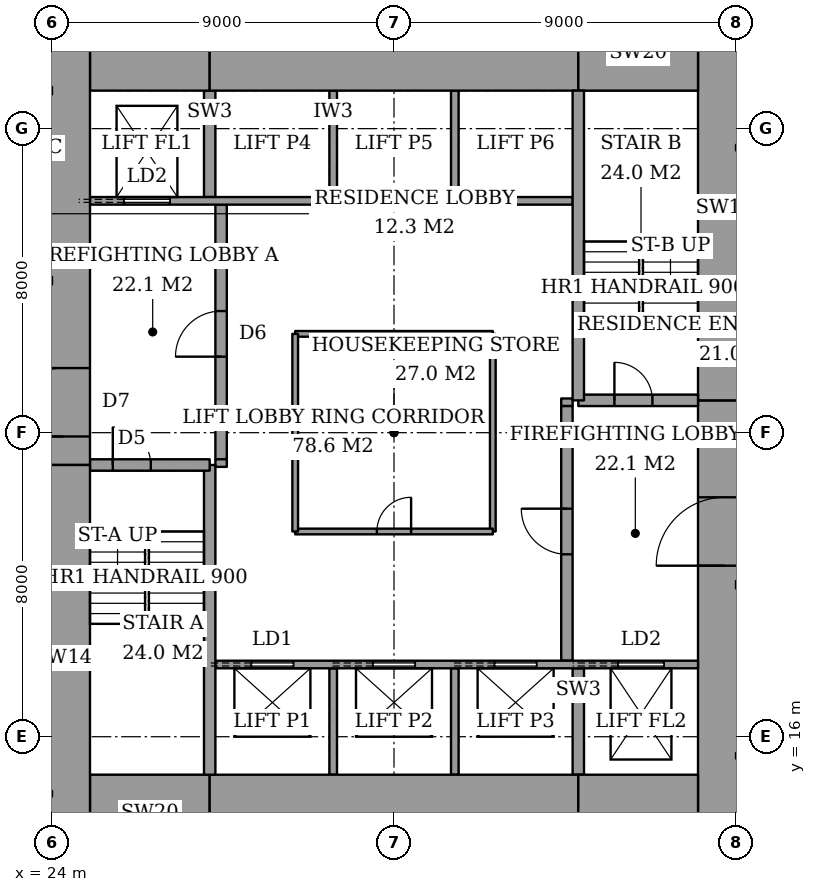
"""IFC4 building model, lengths in metres.
Left out: names, types, materials, properties, quantities, classifications, styles, units other than length and angle.
Written with IfcOpenShell. Run it as: python <this file> out.ifc"""

import sys

from ifc_helpers import new_model, si_unit, direction, frame, frame_2d, origin, place, context, subcontext, project, spatial, rectangle, extrude, element, fill, save


model = new_model("IFC4")
c1 = context("Model", 3, precision=1e-05, world=origin(), true_north=direction((0.0, 1.0)))
c2 = subcontext(c1, "Body", "Model", "MODEL_VIEW")
j1 = project(units=[si_unit("LENGTHUNIT", "METRE"), si_unit("PLANEANGLEUNIT", "RADIAN")], contexts=[c1])
p1 = place(None, origin())
s1 = spatial("IfcSite", under=j1, at=p1, CompositionType="ELEMENT")
p2 = place(p1, origin())
s2 = spatial("IfcBuilding", under=s1, at=p2, CompositionType="ELEMENT")
p3 = place(p2, frame((0.0, 0.0, 33.2)))
s3 = spatial("IfcBuildingStorey", under=s2, at=p3, CompositionType="ELEMENT", Elevation=33.2)
p4 = place(p3, frame((25.0, 14.0, 0.0), z_axis=(0.0, 0.0, 1.0), x_axis=(1.0, 0.0, 0.0)))
e1 = element("IfcWall", 1, at=p4, inside=s3, PredefinedType="SHEAR", context=c2, shape_type="SweptSolid", body=[
    extrude(rectangle(XDim=3.15, YDim=2.0, at=frame_2d((1.575, 0.0))), origin(), (0.0, 0.0, 1.0), 3.6),
])
p5 = place(p3, frame((28.15, 14.0, 0.0), z_axis=(0.0, 0.0, 1.0), x_axis=(1.0, 0.0, 0.0)))
e2 = element("IfcWall", 2, at=p5, inside=s3, PredefinedType="SHEAR", context=c2, shape_type="SweptSolid", body=[
    extrude(rectangle(XDim=9.7, YDim=2.0, at=frame_2d((4.85, 0.0))), origin(), (0.0, 0.0, 1.0), 3.6),
])
for number, where, z_axis, x_axis in (
    (3, (37.85, 14.0, 0.0), (0.0, 0.0, 1.0), (1.0, 0.0, 0.0)),
    (4, (25.0, 34.0, 0.0), (0.0, 0.0, 1.0), (1.0, 0.0, 0.0)),
):
    element("IfcWall", number, at=place(p3, frame(where, z_axis=z_axis, x_axis=x_axis)), inside=s3, PredefinedType="SHEAR", context=c2, shape_type="SweptSolid", body=[
        extrude(rectangle(XDim=3.15, YDim=2.0, at=frame_2d((1.575, 0.0))), origin(), (0.0, 0.0, 1.0), 3.6),
    ])
p6 = place(p3, frame((28.15, 34.0, 0.0), z_axis=(0.0, 0.0, 1.0), x_axis=(1.0, 0.0, 0.0)))
e5 = element("IfcWall", 5, at=p6, inside=s3, PredefinedType="SHEAR", context=c2, shape_type="SweptSolid", body=[
    extrude(rectangle(XDim=9.7, YDim=2.0, at=frame_2d((4.85, 0.0))), origin(), (0.0, 0.0, 1.0), 3.6),
])
p7 = place(p3, frame((37.85, 34.0, 0.0), z_axis=(0.0, 0.0, 1.0), x_axis=(1.0, 0.0, 0.0)))
e6 = element("IfcWall", 6, at=p7, inside=s3, PredefinedType="SHEAR", context=c2, shape_type="SweptSolid", body=[
    extrude(rectangle(XDim=3.15, YDim=2.0, at=frame_2d((1.575, 0.0))), origin(), (0.0, 0.0, 1.0), 3.6),
])
p8 = place(p3, frame((24.3, 13.0, 0.0), z_axis=(0.0, 0.0, 1.0), x_axis=(0.0, 1.0, 0.0)))
e7 = element("IfcWall", 7, at=p8, inside=s3, PredefinedType="SHEAR", context=c2, shape_type="SweptSolid", body=[
    extrude(rectangle(XDim=10.15, YDim=1.4, at=frame_2d((5.075, 0.0))), origin(), (0.0, 0.0, 1.0), 3.6),
])
p9 = place(p3, frame((24.3, 23.15, 0.0), z_axis=(0.0, 0.0, 1.0), x_axis=(0.0, 1.0, 0.0)))
e8 = element("IfcWall", 8, at=p9, inside=s3, PredefinedType="SHEAR", context=c2, shape_type="SweptSolid", body=[
    extrude(rectangle(XDim=11.85, YDim=1.4, at=frame_2d((5.925, 0.0))), origin(), (0.0, 0.0, 1.0), 3.6),
])
p10 = place(p9, frame((0.75, 0.0, 0.0)))
e9 = element("IfcOpeningElement", 9, at=p10, cuts=e8, PredefinedType="OPENING", context=c2, shape_type="SweptSolid", body=[
    extrude(rectangle(XDim=1.8, YDim=2.4, at=frame_2d((0.9, 1.2))), frame((0.0, 0.71, 0.0), z_axis=(0.0, -1.0, 0.0), x_axis=(1.0, 0.0, 0.0)), (0.0, 0.0, 1.0), 1.42),
])
p11 = place(p3, frame((41.7, 13.0, 0.0), z_axis=(0.0, 0.0, 1.0), x_axis=(0.0, 1.0, 0.0)))
e10 = element("IfcWall", 10, at=p11, inside=s3, PredefinedType="SHEAR", context=c2, shape_type="SweptSolid", body=[
    extrude(rectangle(XDim=11.85, YDim=1.4, at=frame_2d((5.925, 0.0))), origin(), (0.0, 0.0, 1.0), 3.6),
])
p12 = place(p11, frame((7.5, 0.0, 0.0)))
e11 = element("IfcOpeningElement", 11, at=p12, cuts=e10, PredefinedType="OPENING", context=c2, shape_type="SweptSolid", body=[
    extrude(rectangle(XDim=1.8, YDim=2.4, at=frame_2d((0.9, 1.2))), frame((0.0, 0.71, 0.0), z_axis=(0.0, -1.0, 0.0), x_axis=(1.0, 0.0, 0.0)), (0.0, 0.0, 1.0), 1.42),
])
p13 = place(p3, frame((41.7, 24.85, 0.0), z_axis=(0.0, 0.0, 1.0), x_axis=(0.0, 1.0, 0.0)))
e12 = element("IfcWall", 12, at=p13, inside=s3, PredefinedType="SHEAR", context=c2, shape_type="SweptSolid", body=[
    extrude(rectangle(XDim=10.15, YDim=1.4, at=frame_2d((5.075, 0.0))), origin(), (0.0, 0.0, 1.0), 3.6),
])
p14 = place(p3, frame((28.15, 15.0, 0.0), z_axis=(0.0, 0.0, 1.0), x_axis=(0.0, 1.0, 0.0)))
e13 = element("IfcWall", 13, at=p14, inside=s3, PredefinedType="SHEAR", context=c2, shape_type="SweptSolid", body=[
    extrude(rectangle(XDim=8.15, YDim=0.3, at=frame_2d((4.075, 0.0))), origin(), (0.0, 0.0, 1.0), 3.6),
])
p15 = place(p3, frame((25.0, 23.15, 0.0), z_axis=(0.0, 0.0, 1.0), x_axis=(1.0, 0.0, 0.0)))
e14 = element("IfcWall", 14, at=p15, inside=s3, PredefinedType="SHEAR", context=c2, shape_type="SweptSolid", body=[
    extrude(rectangle(XDim=3.15, YDim=0.3, at=frame_2d((1.575, 0.0))), origin(), (0.0, 0.0, 1.0), 3.6),
])
p16 = place(p15, frame((0.6, 0.0, 0.0)))
e15 = element("IfcOpeningElement", 15, at=p16, cuts=e14, PredefinedType="OPENING", context=c2, shape_type="SweptSolid", body=[
    extrude(rectangle(XDim=1.0, YDim=2.1, at=frame_2d((0.5, 1.05))), frame((0.0, 0.16, 0.0), z_axis=(0.0, -1.0, 0.0), x_axis=(1.0, 0.0, 0.0)), (0.0, 0.0, 1.0), 0.32),
])
p17 = place(p3, frame((37.85, 24.85, 0.0), z_axis=(0.0, 0.0, 1.0), x_axis=(0.0, 1.0, 0.0)))
e16 = element("IfcWall", 16, at=p17, inside=s3, PredefinedType="SHEAR", context=c2, shape_type="SweptSolid", body=[
    extrude(rectangle(XDim=8.15, YDim=0.3, at=frame_2d((4.075, 0.0))), origin(), (0.0, 0.0, 1.0), 3.6),
])
p18 = place(p3, frame((37.85, 24.85, 0.0), z_axis=(0.0, 0.0, 1.0), x_axis=(1.0, 0.0, 0.0)))
e17 = element("IfcWall", 17, at=p18, inside=s3, PredefinedType="SHEAR", context=c2, shape_type="SweptSolid", body=[
    extrude(rectangle(XDim=3.15, YDim=0.3, at=frame_2d((1.575, 0.0))), origin(), (0.0, 0.0, 1.0), 3.6),
])
p19 = place(p18, frame((0.95, 0.0, 0.0)))
e18 = element("IfcOpeningElement", 18, at=p19, cuts=e17, PredefinedType="OPENING", context=c2, shape_type="SweptSolid", body=[
    extrude(rectangle(XDim=1.0, YDim=2.1, at=frame_2d((0.5, 1.05))), frame((0.0, 0.16, 0.0), z_axis=(0.0, -1.0, 0.0), x_axis=(1.0, 0.0, 0.0)), (0.0, 0.0, 1.0), 0.32),
])
p20 = place(p3, frame((28.45, 23.3, 0.0), z_axis=(0.0, 0.0, 1.0), x_axis=(0.0, 1.0, 0.0)))
e19 = element("IfcWall", 19, at=p20, inside=s3, PredefinedType="PARTITIONING", context=c2, shape_type="SweptSolid", body=[
    extrude(rectangle(XDim=6.7, YDim=0.3, at=frame_2d((3.35, 0.0))), origin(), (0.0, 0.0, 1.0), 3.6),
])
p21 = place(p20, frame((2.7, 0.0, 0.0)))
e20 = element("IfcOpeningElement", 20, at=p21, cuts=e19, PredefinedType="OPENING", context=c2, shape_type="SweptSolid", body=[
    extrude(rectangle(XDim=1.2, YDim=2.1, at=frame_2d((0.6, 1.05))), frame((0.0, 0.16, 0.0), z_axis=(0.0, -1.0, 0.0), x_axis=(1.0, 0.0, 0.0)), (0.0, 0.0, 1.0), 0.32),
])
p22 = place(p3, frame((37.55, 18.0, 0.0), z_axis=(0.0, 0.0, 1.0), x_axis=(0.0, 1.0, 0.0)))
e21 = element("IfcWall", 21, at=p22, inside=s3, PredefinedType="PARTITIONING", context=c2, shape_type="SweptSolid", body=[
    extrude(rectangle(XDim=6.7, YDim=0.3, at=frame_2d((3.35, 0.0))), origin(), (0.0, 0.0, 1.0), 3.6),
])
p23 = place(p22, frame((2.8, 0.0, 0.0)))
e22 = element("IfcOpeningElement", 22, at=p23, cuts=e21, PredefinedType="OPENING", context=c2, shape_type="SweptSolid", body=[
    extrude(rectangle(XDim=1.2, YDim=2.1, at=frame_2d((0.6, 1.05))), frame((0.0, 0.16, 0.0), z_axis=(0.0, -1.0, 0.0), x_axis=(1.0, 0.0, 0.0)), (0.0, 0.0, 1.0), 0.32),
])
p24 = place(p3, frame((28.3, 17.9, 0.0), z_axis=(0.0, 0.0, 1.0), x_axis=(1.0, 0.0, 0.0)))
e23 = element("IfcWall", 23, at=p24, inside=s3, PredefinedType="PARTITIONING", context=c2, shape_type="SweptSolid", body=[
    extrude(rectangle(XDim=12.7, YDim=0.2, at=frame_2d((6.35, 0.0))), origin(), (0.0, 0.0, 1.0), 3.6),
])
p25 = place(p24, frame((0.95, 0.0, 0.0)))
e24 = element("IfcOpeningElement", 24, at=p25, cuts=e23, PredefinedType="OPENING", context=c2, shape_type="SweptSolid", body=[
    extrude(rectangle(XDim=1.1, YDim=2.1, at=frame_2d((0.55, 1.05))), frame((0.0, 0.11, 0.0), z_axis=(0.0, -1.0, 0.0), x_axis=(1.0, 0.0, 0.0)), (0.0, 0.0, 1.0), 0.22),
])
p26 = place(p24, frame((4.15, 0.0, 0.0)))
e25 = element("IfcOpeningElement", 25, at=p26, cuts=e23, PredefinedType="OPENING", context=c2, shape_type="SweptSolid", body=[
    extrude(rectangle(XDim=1.1, YDim=2.1, at=frame_2d((0.55, 1.05))), frame((0.0, 0.11, 0.0), z_axis=(0.0, -1.0, 0.0), x_axis=(1.0, 0.0, 0.0)), (0.0, 0.0, 1.0), 0.22),
])
p27 = place(p24, frame((7.35, 0.0, 0.0)))
e26 = element("IfcOpeningElement", 26, at=p27, cuts=e23, PredefinedType="OPENING", context=c2, shape_type="SweptSolid", body=[
    extrude(rectangle(XDim=1.1, YDim=2.1, at=frame_2d((0.55, 1.05))), frame((0.0, 0.11, 0.0), z_axis=(0.0, -1.0, 0.0), x_axis=(1.0, 0.0, 0.0)), (0.0, 0.0, 1.0), 0.22),
])
p28 = place(p24, frame((10.6, 0.0, 0.0)))
e27 = element("IfcOpeningElement", 27, at=p28, cuts=e23, PredefinedType="OPENING", context=c2, shape_type="SweptSolid", body=[
    extrude(rectangle(XDim=1.2, YDim=2.1, at=frame_2d((0.6, 1.05))), frame((0.0, 0.11, 0.0), z_axis=(0.0, -1.0, 0.0), x_axis=(1.0, 0.0, 0.0)), (0.0, 0.0, 1.0), 0.22),
])
p29 = place(p3, frame((25.0, 30.1, 0.0), z_axis=(0.0, 0.0, 1.0), x_axis=(1.0, 0.0, 0.0)))
e28 = element("IfcWall", 28, at=p29, inside=s3, PredefinedType="PARTITIONING", context=c2, shape_type="SweptSolid", body=[
    extrude(rectangle(XDim=12.7, YDim=0.2, at=frame_2d((6.35, 0.0))), origin(), (0.0, 0.0, 1.0), 3.6),
])
p30 = place(p29, frame((0.9, 0.0, 0.0)))
e29 = element("IfcOpeningElement", 29, at=p30, cuts=e28, PredefinedType="OPENING", context=c2, shape_type="SweptSolid", body=[
    extrude(rectangle(XDim=1.2, YDim=2.1, at=frame_2d((0.6, 1.05))), frame((0.0, 0.11, 0.0), z_axis=(0.0, -1.0, 0.0), x_axis=(1.0, 0.0, 0.0)), (0.0, 0.0, 1.0), 0.22),
])
for number, where, z_axis, x_axis in (
    (30, (31.4, 15.0, 0.0), (0.0, 0.0, 1.0), (0.0, 1.0, 0.0)),
    (31, (34.6, 15.0, 0.0), (0.0, 0.0, 1.0), (0.0, 1.0, 0.0)),
):
    element("IfcWall", number, at=place(p3, frame(where, z_axis=z_axis, x_axis=x_axis)), inside=s3, PredefinedType="PARTITIONING", context=c2, shape_type="SweptSolid", body=[
        extrude(rectangle(XDim=2.8, YDim=0.2, at=frame_2d((1.4, 0.0))), origin(), (0.0, 0.0, 1.0), 3.6),
    ])
p31 = place(p3, frame((37.85, 15.0, 0.0), z_axis=(0.0, 0.0, 1.0), x_axis=(0.0, 1.0, 0.0)))
e32 = element("IfcWall", 32, at=p31, inside=s3, PredefinedType="SHEAR", context=c2, shape_type="SweptSolid", body=[
    extrude(rectangle(XDim=2.8, YDim=0.3, at=frame_2d((1.4, 0.0))), origin(), (0.0, 0.0, 1.0), 3.6),
])
for number, where, z_axis, x_axis in (
    (33, (31.4, 30.2, 0.0), (0.0, 0.0, 1.0), (0.0, 1.0, 0.0)),
    (34, (34.6, 30.2, 0.0), (0.0, 0.0, 1.0), (0.0, 1.0, 0.0)),
):
    element("IfcWall", number, at=place(p3, frame(where, z_axis=z_axis, x_axis=x_axis)), inside=s3, PredefinedType="PARTITIONING", context=c2, shape_type="SweptSolid", body=[
        extrude(rectangle(XDim=2.8, YDim=0.2, at=frame_2d((1.4, 0.0))), origin(), (0.0, 0.0, 1.0), 3.6),
    ])
p32 = place(p3, frame((28.15, 30.2, 0.0), z_axis=(0.0, 0.0, 1.0), x_axis=(0.0, 1.0, 0.0)))
e35 = element("IfcWall", 35, at=p32, inside=s3, PredefinedType="SHEAR", context=c2, shape_type="SweptSolid", body=[
    extrude(rectangle(XDim=2.8, YDim=0.3, at=frame_2d((1.4, 0.0))), origin(), (0.0, 0.0, 1.0), 3.6),
])
for number, where, z_axis, x_axis in (
    (36, (28.3, 23.2, 0.0), (0.0, 0.0, 1.0), (1.0, 0.0, 0.0)),
    (37, (37.4, 24.8, 0.0), (0.0, 0.0, 1.0), (1.0, 0.0, 0.0)),
):
    element("IfcWall", number, at=place(p3, frame(where, z_axis=z_axis, x_axis=x_axis)), inside=s3, PredefinedType="PARTITIONING", context=c2, shape_type="SweptSolid", body=[
        extrude(rectangle(XDim=0.3, YDim=0.2, at=frame_2d((0.15, 0.0))), origin(), (0.0, 0.0, 1.0), 3.6),
    ])
p33 = place(p3, frame((30.4, 21.4, 0.0), z_axis=(0.0, 0.0, 1.0), x_axis=(1.0, 0.0, 0.0)))
e38 = element("IfcWall", 38, at=p33, inside=s3, PredefinedType="PARTITIONING", context=c2, shape_type="SweptSolid", body=[
    extrude(rectangle(XDim=5.2, YDim=0.15, at=frame_2d((2.6, 0.0))), origin(), (0.0, 0.0, 1.0), 3.35),
])
p34 = place(p33, frame((2.15, 0.0, 0.0)))
e39 = element("IfcOpeningElement", 39, at=p34, cuts=e38, PredefinedType="OPENING", context=c2, shape_type="SweptSolid", body=[
    extrude(rectangle(XDim=0.9, YDim=2.1, at=frame_2d((0.45, 1.05))), frame((0.0, 0.085, 0.0), z_axis=(0.0, -1.0, 0.0), x_axis=(1.0, 0.0, 0.0)), (0.0, 0.0, 1.0), 0.17),
])
for number, where, z_axis, x_axis in (
    (40, (30.4, 26.6, 0.0), (0.0, 0.0, 1.0), (1.0, 0.0, 0.0)),
    (41, (30.4, 21.4, 0.0), (0.0, 0.0, 1.0), (0.0, 1.0, 0.0)),
    (42, (35.6, 21.4, 0.0), (0.0, 0.0, 1.0), (0.0, 1.0, 0.0)),
):
    element("IfcWall", number, at=place(p3, frame(where, z_axis=z_axis, x_axis=x_axis)), inside=s3, PredefinedType="PARTITIONING", context=c2, shape_type="SweptSolid", body=[
        extrude(rectangle(XDim=5.2, YDim=0.15, at=frame_2d((2.6, 0.0))), origin(), (0.0, 0.0, 1.0), 3.35),
    ])
p35 = place(p16, origin())
e43 = element("IfcDoor", 43, at=p35, inside=s3, OperationType="SINGLE_SWING_RIGHT", PredefinedType="DOOR", context=c2, shape_type="SweptSolid", body=[
    extrude(rectangle(XDim=1.0, YDim=2.1, at=frame_2d((0.5, 1.05))), frame((0.0, 0.025, 0.0), z_axis=(0.0, -1.0, 0.0), x_axis=(1.0, 0.0, 0.0)), (0.0, 0.0, 1.0), 0.05),
])
fill(e15, e43)
p36 = place(p19, origin())
e44 = element("IfcDoor", 44, at=p36, inside=s3, OperationType="SINGLE_SWING_RIGHT", PredefinedType="DOOR", context=c2, shape_type="SweptSolid", body=[
    extrude(rectangle(XDim=1.0, YDim=2.1, at=frame_2d((0.5, 1.05))), frame((0.0, 0.025, 0.0), z_axis=(0.0, -1.0, 0.0), x_axis=(1.0, 0.0, 0.0)), (0.0, 0.0, 1.0), 0.05),
])
fill(e18, e44)
p37 = place(p21, origin())
e45 = element("IfcDoor", 45, at=p37, inside=s3, OperationType="SINGLE_SWING_RIGHT", PredefinedType="DOOR", context=c2, shape_type="SweptSolid", body=[
    extrude(rectangle(XDim=1.2, YDim=2.1, at=frame_2d((0.6, 1.05))), frame((0.0, 0.025, 0.0), z_axis=(0.0, -1.0, 0.0), x_axis=(1.0, 0.0, 0.0)), (0.0, 0.0, 1.0), 0.05),
])
fill(e20, e45)
p38 = place(p23, origin())
e46 = element("IfcDoor", 46, at=p38, inside=s3, OperationType="SINGLE_SWING_LEFT", PredefinedType="DOOR", context=c2, shape_type="SweptSolid", body=[
    extrude(rectangle(XDim=1.2, YDim=2.1, at=frame_2d((0.6, 1.05))), frame((0.0, 0.025, 0.0), z_axis=(0.0, -1.0, 0.0), x_axis=(1.0, 0.0, 0.0)), (0.0, 0.0, 1.0), 0.05),
])
fill(e22, e46)
p39 = place(p10, origin())
e47 = element("IfcDoor", 47, at=p39, inside=s3, OperationType="DOUBLE_DOOR_DOUBLE_SWING", PredefinedType="DOOR", context=c2, shape_type="SweptSolid", body=[
    extrude(rectangle(XDim=1.8, YDim=2.4, at=frame_2d((0.9, 1.2))), frame((0.0, 0.025, 0.0), z_axis=(0.0, -1.0, 0.0), x_axis=(1.0, 0.0, 0.0)), (0.0, 0.0, 1.0), 0.05),
])
fill(e9, e47)
p40 = place(p12, origin())
e48 = element("IfcDoor", 48, at=p40, inside=s3, OperationType="DOUBLE_DOOR_DOUBLE_SWING", PredefinedType="DOOR", context=c2, shape_type="SweptSolid", body=[
    extrude(rectangle(XDim=1.8, YDim=2.4, at=frame_2d((0.9, 1.2))), frame((0.0, 0.025, 0.0), z_axis=(0.0, -1.0, 0.0), x_axis=(1.0, 0.0, 0.0)), (0.0, 0.0, 1.0), 0.05),
])
fill(e11, e48)
p41 = place(p34, origin())
e49 = element("IfcDoor", 49, at=p41, inside=s3, OperationType="SINGLE_SWING_LEFT", PredefinedType="DOOR", context=c2, shape_type="SweptSolid", body=[
    extrude(rectangle(XDim=0.9, YDim=2.1, at=frame_2d((0.45, 1.05))), frame((0.0, 0.025, 0.0), z_axis=(0.0, -1.0, 0.0), x_axis=(1.0, 0.0, 0.0)), (0.0, 0.0, 1.0), 0.05),
])
fill(e39, e49)
p42 = place(p25, origin())
e50 = element("IfcDoor", 50, at=p42, inside=s3, OperationType="SLIDING_TO_LEFT", PredefinedType="DOOR", context=c2, shape_type="SweptSolid", body=[
    extrude(rectangle(XDim=1.1, YDim=2.1, at=frame_2d((0.55, 1.05))), frame((0.0, 0.025, 0.0), z_axis=(0.0, -1.0, 0.0), x_axis=(1.0, 0.0, 0.0)), (0.0, 0.0, 1.0), 0.05),
])
fill(e24, e50)
p43 = place(p26, origin())
e51 = element("IfcDoor", 51, at=p43, inside=s3, OperationType="SLIDING_TO_LEFT", PredefinedType="DOOR", context=c2, shape_type="SweptSolid", body=[
    extrude(rectangle(XDim=1.1, YDim=2.1, at=frame_2d((0.55, 1.05))), frame((0.0, 0.025, 0.0), z_axis=(0.0, -1.0, 0.0), x_axis=(1.0, 0.0, 0.0)), (0.0, 0.0, 1.0), 0.05),
])
fill(e25, e51)
p44 = place(p27, origin())
e52 = element("IfcDoor", 52, at=p44, inside=s3, OperationType="SLIDING_TO_LEFT", PredefinedType="DOOR", context=c2, shape_type="SweptSolid", body=[
    extrude(rectangle(XDim=1.1, YDim=2.1, at=frame_2d((0.55, 1.05))), frame((0.0, 0.025, 0.0), z_axis=(0.0, -1.0, 0.0), x_axis=(1.0, 0.0, 0.0)), (0.0, 0.0, 1.0), 0.05),
])
fill(e26, e52)
p45 = place(p30, origin())
e53 = element("IfcDoor", 53, at=p45, inside=s3, OperationType="SLIDING_TO_LEFT", PredefinedType="DOOR", context=c2, shape_type="SweptSolid", body=[
    extrude(rectangle(XDim=1.2, YDim=2.1, at=frame_2d((0.6, 1.05))), frame((0.0, 0.025, 0.0), z_axis=(0.0, -1.0, 0.0), x_axis=(1.0, 0.0, 0.0)), (0.0, 0.0, 1.0), 0.05),
])
fill(e29, e53)
p46 = place(p28, origin())
e54 = element("IfcDoor", 54, at=p46, inside=s3, OperationType="SLIDING_TO_LEFT", PredefinedType="DOOR", context=c2, shape_type="SweptSolid", body=[
    extrude(rectangle(XDim=1.2, YDim=2.1, at=frame_2d((0.6, 1.05))), frame((0.0, 0.025, 0.0), z_axis=(0.0, -1.0, 0.0), x_axis=(1.0, 0.0, 0.0)), (0.0, 0.0, 1.0), 0.05),
])
fill(e27, e54)
save(model, sys.argv[1])
